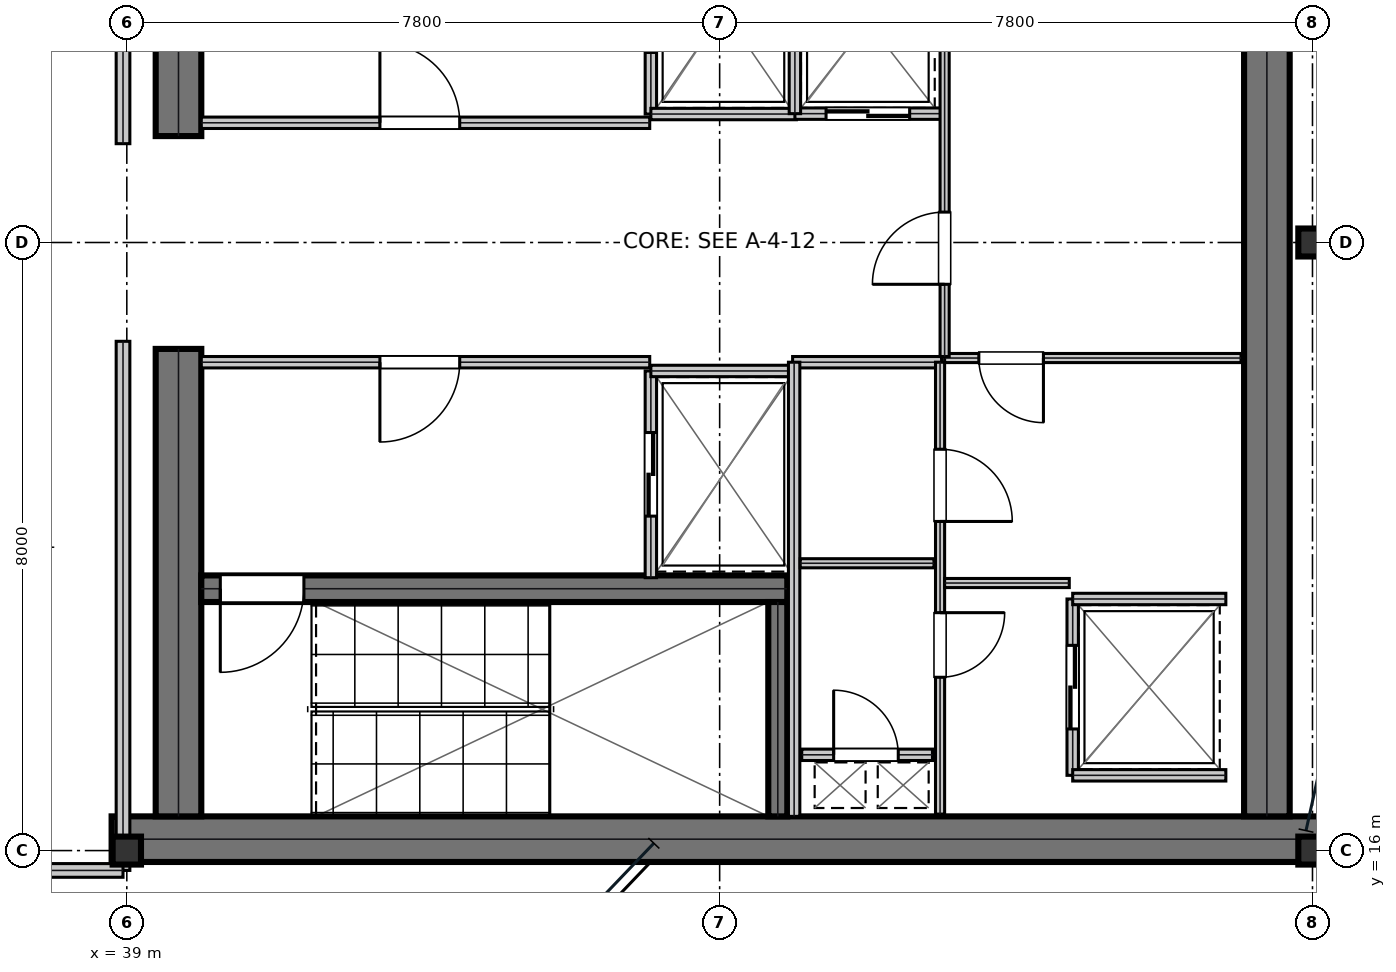
"""IFC4 building model, lengths in metres.
Left out: names, types, materials, properties, quantities, classifications, styles, units other than length and angle.
Written with IfcOpenShell. Run it as: python <this file> out.ifc"""

import sys

from ifc_helpers import new_model, si_unit, direction, frame, frame_2d, origin, origin_2d, place, context, subcontext, project, spatial, rectangle, i_section, extrude, element, fill, save


model = new_model("IFC4")
c1 = context("Model", 3, precision=1e-05, world=origin(), true_north=direction((0.0, 1.0)))
c2 = subcontext(c1, "Body", "Model", "MODEL_VIEW")
j1 = project(units=[si_unit("LENGTHUNIT", "METRE"), si_unit("PLANEANGLEUNIT", "RADIAN")], contexts=[c1])
p1 = place(None, origin())
s1 = spatial("IfcSite", under=j1, at=p1, CompositionType="ELEMENT")
p2 = place(p1, origin())
s2 = spatial("IfcBuilding", under=s1, at=p2, CompositionType="ELEMENT")
p3 = place(p2, frame((0.0, 0.0, 299.25)))
s3 = spatial("IfcBuildingStorey", under=s2, at=p3, CompositionType="ELEMENT", Elevation=299.25)
p4 = place(p3, frame((38.8, 16.15, 0.0), z_axis=(0.0, 0.0, 1.0), x_axis=(1.0, 0.0, 0.0)))
e1 = element("IfcWall", 1, at=p4, inside=s3, PredefinedType="SHEAR", context=c2, shape_type="SweptSolid", body=[
    extrude(rectangle(XDim=16.0, YDim=0.6, at=frame_2d((8.0, 0.0))), origin(), (0.0, 0.0, 1.0), 3.81),
])
for number, where, z_axis, x_axis in (
    (2, (39.68, 16.45, 0.0), (0.0, 0.0, 1.0), (0.0, 1.0, 0.0)),
    (3, (39.68, 25.4, 0.0), (0.0, 0.0, 1.0), (0.0, 1.0, 0.0)),
):
    element("IfcWall", number, at=place(p3, frame(where, z_axis=z_axis, x_axis=x_axis)), inside=s3, PredefinedType="SHEAR", context=c2, shape_type="SweptSolid", body=[
        extrude(rectangle(XDim=6.15, YDim=0.6, at=frame_2d((3.075, 0.0))), origin(), (0.0, 0.0, 1.0), 3.81),
    ])
p5 = place(p3, frame((54.0, 16.45, 0.0), z_axis=(0.0, 0.0, 1.0), x_axis=(0.0, 1.0, 0.0)))
e4 = element("IfcWall", 4, at=p5, inside=s3, PredefinedType="SHEAR", context=c2, shape_type="SweptSolid", body=[
    extrude(rectangle(XDim=15.1, YDim=0.6, at=frame_2d((7.55, 0.0))), origin(), (0.0, 0.0, 1.0), 3.81),
])
p6 = place(p3, frame((39.98, 19.445, 0.0), z_axis=(0.0, 0.0, 1.0), x_axis=(1.0, 0.0, 0.0)))
e5 = element("IfcWall", 5, at=p6, inside=s3, PredefinedType="SHEAR", context=c2, shape_type="SweptSolid", body=[
    extrude(rectangle(XDim=7.71, YDim=0.35, at=frame_2d((3.855, 0.0))), origin(), (0.0, 0.0, 1.0), 3.81),
])
p7 = place(p6, frame((0.25, 0.0, 0.0)))
e6 = element("IfcOpeningElement", 6, at=p7, cuts=e5, PredefinedType="OPENING", context=c2, shape_type="SweptSolid", body=[
    extrude(rectangle(XDim=1.1, YDim=2.15, at=frame_2d((0.55, 1.075))), frame((0.0, 0.185, 0.0), z_axis=(0.0, -1.0, 0.0), x_axis=(1.0, 0.0, 0.0)), (0.0, 0.0, 1.0), 0.37),
])
p8 = place(p3, frame((47.565, 16.45, 0.0), z_axis=(0.0, 0.0, 1.0), x_axis=(0.0, 1.0, 0.0)))
e7 = element("IfcWall", 7, at=p8, inside=s3, PredefinedType="SHEAR", context=c2, shape_type="SweptSolid", body=[
    extrude(rectangle(XDim=2.82, YDim=0.25, at=frame_2d((1.41, 0.0))), origin(), (0.0, 0.0, 1.0), 3.81),
])
for number, where, z_axis, x_axis in (
    (8, (39.0, 16.0, 0.0), (0.0, 0.0, 1.0), (1.0, 0.0, 0.0)),
    (9, (54.6, 16.0, 0.0), (0.0, 0.0, 1.0), (1.0, 0.0, 0.0)),
    (10, (54.6, 24.0, 0.0), (0.0, 0.0, 1.0), (1.0, 0.0, 0.0)),
):
    element("IfcColumn", number, at=place(p3, frame(where, z_axis=z_axis, x_axis=x_axis)), inside=s3, PredefinedType="COLUMN", context=c2, shape_type="SweptSolid", body=[
        extrude(i_section(OverallWidth=0.373, OverallDepth=0.368, WebThickness=0.015, FlangeThickness=0.024, at=origin_2d()), origin(), (0.0, 0.0, 1.0), 4.044),
    ])
p9 = place(p3, frame((39.98, 25.575, 0.0), z_axis=(0.0, 0.0, 1.0), x_axis=(1.0, 0.0, 0.0)))
e11 = element("IfcWall", 11, at=p9, inside=s3, PredefinedType="PARTITIONING", context=c2, shape_type="SweptSolid", body=[
    extrude(rectangle(XDim=5.9, YDim=0.15, at=frame_2d((2.95, 0.0))), origin(), (0.0, 0.0, 1.0), 3.81),
])
p10 = place(p9, frame((2.35, 0.0, 0.0)))
e12 = element("IfcOpeningElement", 12, at=p10, cuts=e11, PredefinedType="OPENING", context=c2, shape_type="SweptSolid", body=[
    extrude(rectangle(XDim=1.05, YDim=2.15, at=frame_2d((0.525, 1.075))), frame((0.0, 0.085, 0.0), z_axis=(0.0, -1.0, 0.0), x_axis=(1.0, 0.0, 0.0)), (0.0, 0.0, 1.0), 0.17),
])
p11 = place(p3, frame((39.98, 22.425, 0.0), z_axis=(0.0, 0.0, 1.0), x_axis=(1.0, 0.0, 0.0)))
e13 = element("IfcWall", 13, at=p11, inside=s3, PredefinedType="PARTITIONING", context=c2, shape_type="SweptSolid", body=[
    extrude(rectangle(XDim=5.9, YDim=0.15, at=frame_2d((2.95, 0.0))), origin(), (0.0, 0.0, 1.0), 3.81),
])
p12 = place(p11, frame((2.35, 0.0, 0.0)))
e14 = element("IfcOpeningElement", 14, at=p12, cuts=e13, PredefinedType="OPENING", context=c2, shape_type="SweptSolid", body=[
    extrude(rectangle(XDim=1.05, YDim=2.15, at=frame_2d((0.525, 1.075))), frame((0.0, 0.085, 0.0), z_axis=(0.0, -1.0, 0.0), x_axis=(1.0, 0.0, 0.0)), (0.0, 0.0, 1.0), 0.17),
])
p13 = place(p3, frame((45.895, 25.69, 0.0), z_axis=(0.0, 0.0, 1.0), x_axis=(0.0, 1.0, 0.0)))
e15 = element("IfcWall", 15, at=p13, inside=s3, PredefinedType="PARTITIONING", context=c2, shape_type="SweptSolid", body=[
    extrude(rectangle(XDim=2.72, YDim=0.15, at=frame_2d((1.36, 0.0))), origin(), (0.0, 0.0, 1.0), 3.81),
])
p14 = place(p13, frame((0.81, 0.0, 0.0)))
e16 = element("IfcOpeningElement", 16, at=p14, cuts=e15, PredefinedType="OPENING", context=c2, shape_type="SweptSolid", body=[
    extrude(rectangle(XDim=1.1, YDim=2.15, at=frame_2d((0.55, 1.075))), frame((0.0, 0.085, 0.0), z_axis=(0.0, -1.0, 0.0), x_axis=(1.0, 0.0, 0.0)), (0.0, 0.0, 1.0), 0.17),
])
p15 = place(p3, frame((45.895, 25.69, 0.0), z_axis=(0.0, 0.0, 1.0), x_axis=(1.0, 0.0, 0.0)))
e17 = element("IfcWall", 17, at=p15, inside=s3, PredefinedType="PARTITIONING", context=c2, shape_type="SweptSolid", body=[
    extrude(rectangle(XDim=1.915, YDim=0.15, at=frame_2d((0.958, 0.0))), origin(), (0.0, 0.0, 1.0), 3.81),
])
p16 = place(p3, frame((45.895, 19.59, 0.0), z_axis=(0.0, 0.0, 1.0), x_axis=(0.0, 1.0, 0.0)))
e18 = element("IfcWall", 18, at=p16, inside=s3, PredefinedType="PARTITIONING", context=c2, shape_type="SweptSolid", body=[
    extrude(rectangle(XDim=2.72, YDim=0.15, at=frame_2d((1.36, 0.0))), origin(), (0.0, 0.0, 1.0), 3.81),
])
p17 = place(p16, frame((0.81, 0.0, 0.0)))
e19 = element("IfcOpeningElement", 19, at=p17, cuts=e18, PredefinedType="OPENING", context=c2, shape_type="SweptSolid", body=[
    extrude(rectangle(XDim=1.1, YDim=2.15, at=frame_2d((0.55, 1.075))), frame((0.0, 0.085, 0.0), z_axis=(0.0, -1.0, 0.0), x_axis=(1.0, 0.0, 0.0)), (0.0, 0.0, 1.0), 0.17),
])
p18 = place(p3, frame((45.895, 22.31, 0.0), z_axis=(0.0, 0.0, 1.0), x_axis=(1.0, 0.0, 0.0)))
e20 = element("IfcWall", 20, at=p18, inside=s3, PredefinedType="PARTITIONING", context=c2, shape_type="SweptSolid", body=[
    extrude(rectangle(XDim=1.915, YDim=0.15, at=frame_2d((0.958, 0.0))), origin(), (0.0, 0.0, 1.0), 3.81),
])
p19 = place(p3, frame((47.79, 25.695, 0.0), z_axis=(0.0, 0.0, 1.0), x_axis=(1.0, 0.0, 0.0)))
e21 = element("IfcWall", 21, at=p19, inside=s3, PredefinedType="PARTITIONING", context=c2, shape_type="SweptSolid", body=[
    extrude(rectangle(XDim=1.92, YDim=0.15, at=frame_2d((0.96, 0.0))), origin(), (0.0, 0.0, 1.0), 3.81),
])
p20 = place(p19, frame((0.41, 0.0, 0.0)))
e22 = element("IfcOpeningElement", 22, at=p20, cuts=e21, PredefinedType="OPENING", context=c2, shape_type="SweptSolid", body=[
    extrude(rectangle(XDim=1.1, YDim=2.15, at=frame_2d((0.55, 1.075))), frame((0.0, 0.085, 0.0), z_axis=(0.0, -1.0, 0.0), x_axis=(1.0, 0.0, 0.0)), (0.0, 0.0, 1.0), 0.17),
])
p21 = place(p3, frame((47.79, 25.695, 0.0), z_axis=(0.0, 0.0, 1.0), x_axis=(0.0, 1.0, 0.0)))
e23 = element("IfcWall", 23, at=p21, inside=s3, PredefinedType="PARTITIONING", context=c2, shape_type="SweptSolid", body=[
    extrude(rectangle(XDim=2.415, YDim=0.15, at=frame_2d((1.208, 0.0))), origin(), (0.0, 0.0, 1.0), 3.81),
])
p22 = place(p3, frame((51.445, 16.99, 0.0), z_axis=(0.0, 0.0, 1.0), x_axis=(0.0, 1.0, 0.0)))
e24 = element("IfcWall", 24, at=p22, inside=s3, PredefinedType="PARTITIONING", context=c2, shape_type="SweptSolid", body=[
    extrude(rectangle(XDim=2.32, YDim=0.15, at=frame_2d((1.16, 0.0))), origin(), (0.0, 0.0, 1.0), 3.81),
])
p23 = place(p22, frame((0.61, 0.0, 0.0)))
e25 = element("IfcOpeningElement", 25, at=p23, cuts=e24, PredefinedType="OPENING", context=c2, shape_type="SweptSolid", body=[
    extrude(rectangle(XDim=1.1, YDim=2.15, at=frame_2d((0.55, 1.075))), frame((0.0, 0.085, 0.0), z_axis=(0.0, -1.0, 0.0), x_axis=(1.0, 0.0, 0.0)), (0.0, 0.0, 1.0), 0.17),
])
for number, where, z_axis, x_axis in (
    (26, (51.445, 16.99, 0.0), (0.0, 0.0, 1.0), (1.0, 0.0, 0.0)),
    (27, (51.445, 19.31, 0.0), (0.0, 0.0, 1.0), (1.0, 0.0, 0.0)),
):
    element("IfcWall", number, at=place(p3, frame(where, z_axis=z_axis, x_axis=x_axis)), inside=s3, PredefinedType="PARTITIONING", context=c2, shape_type="SweptSolid", body=[
        extrude(rectangle(XDim=2.015, YDim=0.15, at=frame_2d((1.007, 0.0))), origin(), (0.0, 0.0, 1.0), 3.81),
    ])
p24 = place(p3, frame((47.88, 17.26, 0.0), z_axis=(0.0, 0.0, 1.0), x_axis=(1.0, 0.0, 0.0)))
e28 = element("IfcWall", 28, at=p24, inside=s3, PredefinedType="PARTITIONING", context=c2, shape_type="SweptSolid", body=[
    extrude(rectangle(XDim=1.72, YDim=0.15, at=frame_2d((0.86, 0.0))), origin(), (0.0, 0.0, 1.0), 3.81),
])
p25 = place(p24, frame((0.42, 0.0, 0.0)))
e29 = element("IfcOpeningElement", 29, at=p25, cuts=e28, PredefinedType="OPENING", context=c2, shape_type="SweptSolid", body=[
    extrude(rectangle(XDim=0.85, YDim=2.15, at=frame_2d((0.425, 1.075))), frame((0.0, 0.085, 0.0), z_axis=(0.0, -1.0, 0.0), x_axis=(1.0, 0.0, 0.0)), (0.0, 0.0, 1.0), 0.17),
])
p26 = place(p3, frame((47.76, 22.425, 0.0), z_axis=(0.0, 0.0, 1.0), x_axis=(1.0, 0.0, 0.0)))
e30 = element("IfcWall", 30, at=p26, inside=s3, PredefinedType="PARTITIONING", context=c2, shape_type="SweptSolid", body=[
    extrude(rectangle(XDim=1.96, YDim=0.15, at=frame_2d((0.98, 0.0))), origin(), (0.0, 0.0, 1.0), 3.81),
])
p27 = place(p3, frame((47.78, 16.45, 0.0), z_axis=(0.0, 0.0, 1.0), x_axis=(0.0, 1.0, 0.0)))
e31 = element("IfcWall", 31, at=p27, inside=s3, PredefinedType="PARTITIONING", context=c2, shape_type="SweptSolid", body=[
    extrude(rectangle(XDim=5.975, YDim=0.15, at=frame_2d((2.988, 0.0))), origin(), (0.0, 0.0, 1.0), 3.81),
])
p28 = place(p3, frame((47.86, 19.78, 0.0), z_axis=(0.0, 0.0, 1.0), x_axis=(1.0, 0.0, 0.0)))
e32 = element("IfcWall", 32, at=p28, inside=s3, PredefinedType="PARTITIONING", context=c2, shape_type="SweptSolid", body=[
    extrude(rectangle(XDim=1.76, YDim=0.12, at=frame_2d((0.88, 0.0))), origin(), (0.0, 0.0, 1.0), 3.81),
])
p29 = place(p3, frame((49.7, 16.48, 0.0), z_axis=(0.0, 0.0, 1.0), x_axis=(0.0, 1.0, 0.0)))
e33 = element("IfcWall", 33, at=p29, inside=s3, PredefinedType="PARTITIONING", context=c2, shape_type="SweptSolid", body=[
    extrude(rectangle(XDim=5.945, YDim=0.12, at=frame_2d((2.973, 0.0))), origin(), (0.0, 0.0, 1.0), 3.81),
])
p30 = place(p29, frame((1.8, 0.0, 0.0)))
e34 = element("IfcOpeningElement", 34, at=p30, cuts=e33, PredefinedType="OPENING", context=c2, shape_type="SweptSolid", body=[
    extrude(rectangle(XDim=0.85, YDim=2.15, at=frame_2d((0.425, 1.075))), frame((0.0, 0.07, 0.0), z_axis=(0.0, -1.0, 0.0), x_axis=(1.0, 0.0, 0.0)), (0.0, 0.0, 1.0), 0.14),
])
p31 = place(p29, frame((3.85, 0.0, 0.0)))
e35 = element("IfcOpeningElement", 35, at=p31, cuts=e33, PredefinedType="OPENING", context=c2, shape_type="SweptSolid", body=[
    extrude(rectangle(XDim=0.95, YDim=2.15, at=frame_2d((0.475, 1.075))), frame((0.0, 0.07, 0.0), z_axis=(0.0, -1.0, 0.0), x_axis=(1.0, 0.0, 0.0)), (0.0, 0.0, 1.0), 0.14),
])
p32 = place(p3, frame((49.76, 22.48, 0.0), z_axis=(0.0, 0.0, 1.0), x_axis=(1.0, 0.0, 0.0)))
e36 = element("IfcWall", 36, at=p32, inside=s3, PredefinedType="PARTITIONING", context=c2, shape_type="SweptSolid", body=[
    extrude(rectangle(XDim=3.9, YDim=0.12, at=frame_2d((1.95, 0.0))), origin(), (0.0, 0.0, 1.0), 3.81),
])
p33 = place(p32, frame((0.45, 0.0, 0.0)))
e37 = element("IfcOpeningElement", 37, at=p33, cuts=e36, PredefinedType="OPENING", context=c2, shape_type="SweptSolid", body=[
    extrude(rectangle(XDim=0.85, YDim=2.15, at=frame_2d((0.425, 1.075))), frame((0.0, 0.07, 0.0), z_axis=(0.0, -1.0, 0.0), x_axis=(1.0, 0.0, 0.0)), (0.0, 0.0, 1.0), 0.14),
])
p34 = place(p3, frame((49.76, 19.52, 0.0), z_axis=(0.0, 0.0, 1.0), x_axis=(1.0, 0.0, 0.0)))
e38 = element("IfcWall", 38, at=p34, inside=s3, PredefinedType="PARTITIONING", context=c2, shape_type="SweptSolid", body=[
    extrude(rectangle(XDim=1.64, YDim=0.12, at=frame_2d((0.82, 0.0))), origin(), (0.0, 0.0, 1.0), 3.81),
])
p35 = place(p3, frame((49.76, 22.5, 0.0), z_axis=(0.0, 0.0, 1.0), x_axis=(0.0, 1.0, 0.0)))
e39 = element("IfcWall", 39, at=p35, inside=s3, PredefinedType="PARTITIONING", context=c2, shape_type="SweptSolid", body=[
    extrude(rectangle(XDim=5.72, YDim=0.12, at=frame_2d((2.86, 0.0))), origin(), (0.0, 0.0, 1.0), 3.81),
])
p36 = place(p35, frame((0.95, 0.0, 0.0)))
e40 = element("IfcOpeningElement", 40, at=p36, cuts=e39, PredefinedType="OPENING", context=c2, shape_type="SweptSolid", body=[
    extrude(rectangle(XDim=0.95, YDim=2.15, at=frame_2d((0.475, 1.075))), frame((0.0, 0.07, 0.0), z_axis=(0.0, -1.0, 0.0), x_axis=(1.0, 0.0, 0.0)), (0.0, 0.0, 1.0), 0.14),
])
p37 = place(p3, frame((38.95, 15.739, 0.0), z_axis=(0.0, 0.0, 1.0), x_axis=(0.0, 1.0, 0.0)))
e41 = element("IfcWall", 41, at=p37, inside=s3, PredefinedType="SOLIDWALL", context=c2, shape_type="SweptSolid", body=[
    extrude(rectangle(XDim=6.961, YDim=0.18, at=frame_2d((3.48, 0.0))), origin(), (0.0, 0.0, 1.0), 3.27),
])
p38 = place(p3, frame((37.05, 15.739, 0.0), z_axis=(0.0, 0.0, 1.0), x_axis=(1.0, 0.0, 0.0)))
e42 = element("IfcWall", 42, at=p38, inside=s3, PredefinedType="SOLIDWALL", context=c2, shape_type="SweptSolid", body=[
    extrude(rectangle(XDim=1.9, YDim=0.18, at=frame_2d((0.95, 0.0))), origin(), (0.0, 0.0, 1.0), 3.27),
])
p39 = place(p3, frame((38.95, 25.3, 0.0), z_axis=(0.0, 0.0, 1.0), x_axis=(0.0, 1.0, 0.0)))
e43 = element("IfcWall", 43, at=p39, inside=s3, PredefinedType="SOLIDWALL", context=c2, shape_type="SweptSolid", body=[
    extrude(rectangle(XDim=6.961, YDim=0.18, at=frame_2d((3.48, 0.0))), origin(), (0.0, 0.0, 1.0), 3.27),
])
p40 = place(p10, origin())
e44 = element("IfcDoor", 44, at=p40, inside=s3, OperationType="SINGLE_SWING_LEFT", PredefinedType="DOOR", context=c2, shape_type="SweptSolid", body=[
    extrude(rectangle(XDim=1.05, YDim=2.15, at=frame_2d((0.525, 1.075))), frame((0.0, 0.025, 0.0), z_axis=(0.0, -1.0, 0.0), x_axis=(1.0, 0.0, 0.0)), (0.0, 0.0, 1.0), 0.05),
])
fill(e12, e44)
p41 = place(p12, frame((1.05, 0.0, 0.0), z_axis=(0.0, 0.0, 1.0), x_axis=(-1.0, 0.0, 0.0)))
e45 = element("IfcDoor", 45, at=p41, inside=s3, OperationType="SINGLE_SWING_RIGHT", PredefinedType="DOOR", context=c2, shape_type="SweptSolid", body=[
    extrude(rectangle(XDim=1.05, YDim=2.15, at=frame_2d((0.525, 1.075))), frame((0.0, 0.025, 0.0), z_axis=(0.0, -1.0, 0.0), x_axis=(1.0, 0.0, 0.0)), (0.0, 0.0, 1.0), 0.05),
])
fill(e14, e45)
p42 = place(p17, frame((1.1, 0.0, 0.0), z_axis=(0.0, 0.0, 1.0), x_axis=(-1.0, 0.0, 0.0)))
e46 = element("IfcDoor", 46, at=p42, inside=s3, OperationType="DOUBLE_DOOR_SLIDING", PredefinedType="DOOR", context=c2, shape_type="SweptSolid", body=[
    extrude(rectangle(XDim=1.1, YDim=2.15, at=frame_2d((0.55, 1.075))), frame((0.0, 0.025, 0.0), z_axis=(0.0, -1.0, 0.0), x_axis=(1.0, 0.0, 0.0)), (0.0, 0.0, 1.0), 0.05),
])
fill(e19, e46)
p43 = place(p20, frame((1.1, 0.0, 0.0), z_axis=(0.0, 0.0, 1.0), x_axis=(-1.0, 0.0, 0.0)))
e47 = element("IfcDoor", 47, at=p43, inside=s3, OperationType="DOUBLE_DOOR_SLIDING", PredefinedType="DOOR", context=c2, shape_type="SweptSolid", body=[
    extrude(rectangle(XDim=1.1, YDim=2.15, at=frame_2d((0.55, 1.075))), frame((0.0, 0.025, 0.0), z_axis=(0.0, -1.0, 0.0), x_axis=(1.0, 0.0, 0.0)), (0.0, 0.0, 1.0), 0.05),
])
fill(e22, e47)
p44 = place(p23, frame((1.1, 0.0, 0.0), z_axis=(0.0, 0.0, 1.0), x_axis=(-1.0, 0.0, 0.0)))
e48 = element("IfcDoor", 48, at=p44, inside=s3, OperationType="DOUBLE_DOOR_SLIDING", PredefinedType="DOOR", context=c2, shape_type="SweptSolid", body=[
    extrude(rectangle(XDim=1.1, YDim=2.15, at=frame_2d((0.55, 1.075))), frame((0.0, 0.025, 0.0), z_axis=(0.0, -1.0, 0.0), x_axis=(1.0, 0.0, 0.0)), (0.0, 0.0, 1.0), 0.05),
])
fill(e25, e48)
p45 = place(p25, origin())
e49 = element("IfcDoor", 49, at=p45, inside=s3, OperationType="SINGLE_SWING_LEFT", PredefinedType="TRAPDOOR", context=c2, shape_type="SweptSolid", body=[
    extrude(rectangle(XDim=0.85, YDim=2.15, at=frame_2d((0.425, 1.075))), frame((0.0, 0.025, 0.0), z_axis=(0.0, -1.0, 0.0), x_axis=(1.0, 0.0, 0.0)), (0.0, 0.0, 1.0), 0.05),
])
fill(e29, e49)
p46 = place(p30, frame((0.85, 0.0, 0.0), z_axis=(0.0, 0.0, 1.0), x_axis=(-1.0, 0.0, 0.0)))
e50 = element("IfcDoor", 50, at=p46, inside=s3, OperationType="SINGLE_SWING_LEFT", PredefinedType="DOOR", context=c2, shape_type="SweptSolid", body=[
    extrude(rectangle(XDim=0.85, YDim=2.15, at=frame_2d((0.425, 1.075))), frame((0.0, 0.025, 0.0), z_axis=(0.0, -1.0, 0.0), x_axis=(1.0, 0.0, 0.0)), (0.0, 0.0, 1.0), 0.05),
])
fill(e34, e50)
p47 = place(p31, frame((0.95, 0.0, 0.0), z_axis=(0.0, 0.0, 1.0), x_axis=(-1.0, 0.0, 0.0)))
e51 = element("IfcDoor", 51, at=p47, inside=s3, OperationType="SINGLE_SWING_RIGHT", PredefinedType="DOOR", context=c2, shape_type="SweptSolid", body=[
    extrude(rectangle(XDim=0.95, YDim=2.15, at=frame_2d((0.475, 1.075))), frame((0.0, 0.025, 0.0), z_axis=(0.0, -1.0, 0.0), x_axis=(1.0, 0.0, 0.0)), (0.0, 0.0, 1.0), 0.05),
])
fill(e35, e51)
p48 = place(p33, frame((0.85, 0.0, 0.0), z_axis=(0.0, 0.0, 1.0), x_axis=(-1.0, 0.0, 0.0)))
e52 = element("IfcDoor", 52, at=p48, inside=s3, OperationType="SINGLE_SWING_LEFT", PredefinedType="DOOR", context=c2, shape_type="SweptSolid", body=[
    extrude(rectangle(XDim=0.85, YDim=2.15, at=frame_2d((0.425, 1.075))), frame((0.0, 0.025, 0.0), z_axis=(0.0, -1.0, 0.0), x_axis=(1.0, 0.0, 0.0)), (0.0, 0.0, 1.0), 0.05),
])
fill(e37, e52)
p49 = place(p36, origin())
e53 = element("IfcDoor", 53, at=p49, inside=s3, OperationType="SINGLE_SWING_LEFT", PredefinedType="DOOR", context=c2, shape_type="SweptSolid", body=[
    extrude(rectangle(XDim=0.95, YDim=2.15, at=frame_2d((0.475, 1.075))), frame((0.0, 0.025, 0.0), z_axis=(0.0, -1.0, 0.0), x_axis=(1.0, 0.0, 0.0)), (0.0, 0.0, 1.0), 0.05),
])
fill(e40, e53)
p50 = place(p7, frame((1.1, 0.0, 0.0), z_axis=(0.0, 0.0, 1.0), x_axis=(-1.0, 0.0, 0.0)))
e54 = element("IfcDoor", 54, at=p50, inside=s3, OperationType="SINGLE_SWING_RIGHT", PredefinedType="DOOR", context=c2, shape_type="SweptSolid", body=[
    extrude(rectangle(XDim=1.1, YDim=2.15, at=frame_2d((0.55, 1.075))), frame((0.0, 0.025, 0.0), z_axis=(0.0, -1.0, 0.0), x_axis=(1.0, 0.0, 0.0)), (0.0, 0.0, 1.0), 0.05),
])
fill(e6, e54)
save(model, sys.argv[1])
